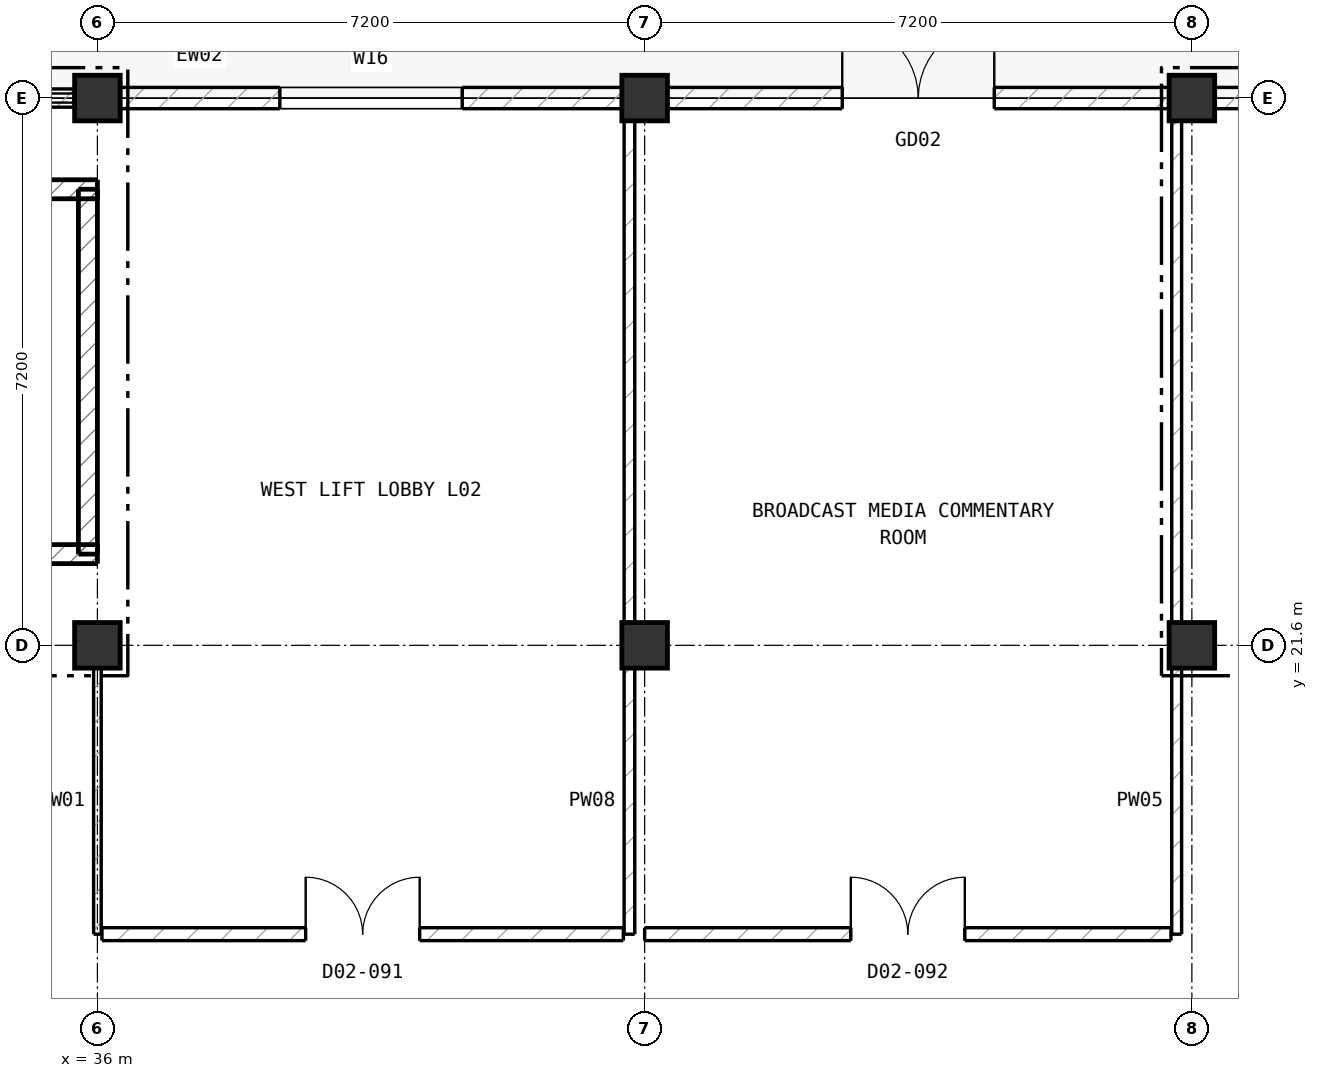
"""IFC4 building model, lengths in metres.
Left out: names, types, materials, properties, quantities, classifications, styles, units other than length and angle.
Written with IfcOpenShell. Run it as: python <this file> out.ifc"""

import sys

from ifc_helpers import new_model, si_unit, direction, frame, frame_2d, origin, origin_2d, place, context, subcontext, project, spatial, rectangle, extrude, element, fill, save


model = new_model("IFC4")
c1 = context("Model", 3, precision=1e-05, world=origin(), true_north=direction((0.0, 1.0)))
c2 = subcontext(c1, "Body", "Model", "MODEL_VIEW")
j1 = project(units=[si_unit("LENGTHUNIT", "METRE"), si_unit("PLANEANGLEUNIT", "RADIAN")], contexts=[c1])
p1 = place(None, origin())
s1 = spatial("IfcSite", under=j1, at=p1, CompositionType="ELEMENT")
p2 = place(p1, origin())
s2 = spatial("IfcBuilding", under=s1, at=p2, CompositionType="ELEMENT")
p3 = place(p2, frame((0.0, 0.0, 11.2)))
s3 = spatial("IfcBuildingStorey", under=s2, at=p3, CompositionType="ELEMENT", Elevation=11.2)
for number, where, z_axis, x_axis in (
    (1, (36.0, 21.6, 0.0), (0.0, 0.0, 1.0), (1.0, 0.0, 0.0)),
    (2, (36.0, 28.8, 0.0), (0.0, 0.0, 1.0), (1.0, 0.0, 0.0)),
    (3, (43.2, 21.6, 0.0), (0.0, 0.0, 1.0), (1.0, 0.0, 0.0)),
    (4, (43.2, 28.8, 0.0), (0.0, 0.0, 1.0), (1.0, 0.0, 0.0)),
    (5, (50.4, 21.6, 0.0), (0.0, 0.0, 1.0), (1.0, 0.0, 0.0)),
    (6, (50.4, 28.8, 0.0), (0.0, 0.0, 1.0), (1.0, 0.0, 0.0)),
):
    element("IfcColumn", number, at=place(p3, frame(where, z_axis=z_axis, x_axis=x_axis)), inside=s3, PredefinedType="COLUMN", context=c2, shape_type="SweptSolid", body=[
        extrude(rectangle(XDim=0.6, YDim=0.6, at=origin_2d()), origin(), (0.0, 0.0, 1.0), 4.8),
    ])
p4 = place(p3, frame((29.085, 28.8, 0.0), z_axis=(0.0, 0.0, 1.0), x_axis=(1.0, 0.0, 0.0)))
e7 = element("IfcWall", 7, at=p4, inside=s3, PredefinedType="SOLIDWALL", context=c2, shape_type="SweptSolid", body=[
    extrude(rectangle(XDim=6.63, YDim=0.24, at=frame_2d((3.315, 0.0))), origin(), (0.0, 0.0, 1.0), 0.35),
])
p5 = place(p3, frame((36.285, 28.8, 0.0), z_axis=(0.0, 0.0, 1.0), x_axis=(1.0, 0.0, 0.0)))
e8 = element("IfcWall", 8, at=p5, inside=s3, PredefinedType="SOLIDWALL", context=c2, shape_type="SweptSolid", body=[
    extrude(rectangle(XDim=6.63, YDim=0.28, at=frame_2d((3.315, 0.0))), origin(), (0.0, 0.0, 1.0), 4.185),
])
p6 = place(p5, frame((2.115, 0.0, 0.9)))
e9 = element("IfcOpeningElement", 9, at=p6, cuts=e8, PredefinedType="OPENING", context=c2, shape_type="SweptSolid", body=[
    extrude(rectangle(XDim=2.4, YDim=2.1, at=frame_2d((1.2, 1.05))), frame((0.0, 0.15, 0.0), z_axis=(0.0, -1.0, 0.0), x_axis=(1.0, 0.0, 0.0)), (0.0, 0.0, 1.0), 0.3),
])
p7 = place(p3, frame((43.485, 28.8, 0.0), z_axis=(0.0, 0.0, 1.0), x_axis=(1.0, 0.0, 0.0)))
e10 = element("IfcWall", 10, at=p7, inside=s3, PredefinedType="SOLIDWALL", context=c2, shape_type="SweptSolid", body=[
    extrude(rectangle(XDim=6.63, YDim=0.28, at=frame_2d((3.315, 0.0))), origin(), (0.0, 0.0, 1.0), 4.185),
])
p8 = place(p7, frame((2.315, 0.0, 0.0)))
e11 = element("IfcOpeningElement", 11, at=p8, cuts=e10, PredefinedType="OPENING", context=c2, shape_type="SweptSolid", body=[
    extrude(rectangle(XDim=2.0, YDim=2.4, at=frame_2d((1.0, 1.2))), frame((0.0, 0.15, 0.0), z_axis=(0.0, -1.0, 0.0), x_axis=(1.0, 0.0, 0.0)), (0.0, 0.0, 1.0), 0.3),
])
p9 = place(p3, frame((50.685, 28.8, 0.0), z_axis=(0.0, 0.0, 1.0), x_axis=(1.0, 0.0, 0.0)))
e12 = element("IfcWall", 12, at=p9, inside=s3, PredefinedType="SOLIDWALL", context=c2, shape_type="SweptSolid", body=[
    extrude(rectangle(XDim=6.63, YDim=0.28, at=frame_2d((3.315, 0.0))), origin(), (0.0, 0.0, 1.0), 4.185),
])
p10 = place(p9, frame((2.115, 0.0, 0.9)))
e13 = element("IfcOpeningElement", 13, at=p10, cuts=e12, PredefinedType="OPENING", context=c2, shape_type="SweptSolid", body=[
    extrude(rectangle(XDim=2.4, YDim=2.1, at=frame_2d((1.2, 1.05))), frame((0.0, 0.15, 0.0), z_axis=(0.0, -1.0, 0.0), x_axis=(1.0, 0.0, 0.0)), (0.0, 0.0, 1.0), 0.3),
])
p11 = place(p3, frame((28.35, 27.6, 0.0), z_axis=(0.0, 0.0, 1.0), x_axis=(1.0, 0.0, 0.0)))
e14 = element("IfcWall", 14, at=p11, inside=s3, PredefinedType="SHEAR", context=c2, shape_type="SweptSolid", body=[
    extrude(rectangle(XDim=7.65, YDim=0.25, at=frame_2d((3.825, 0.0))), origin(), (0.0, 0.0, 1.0), 4.8),
])
p12 = place(p3, frame((35.875, 27.6, 0.0), z_axis=(0.0, 0.0, 1.0), x_axis=(0.0, -1.0, 0.0)))
e15 = element("IfcWall", 15, at=p12, inside=s3, PredefinedType="SHEAR", context=c2, shape_type="SweptSolid", body=[
    extrude(rectangle(XDim=4.8, YDim=0.25, at=frame_2d((2.4, 0.0))), origin(), (0.0, 0.0, 1.0), 4.8),
])
p13 = place(p3, frame((36.0, 22.8, 0.0), z_axis=(0.0, 0.0, 1.0), x_axis=(-1.0, 0.0, 0.0)))
e16 = element("IfcWall", 16, at=p13, inside=s3, PredefinedType="SHEAR", context=c2, shape_type="SweptSolid", body=[
    extrude(rectangle(XDim=7.65, YDim=0.25, at=frame_2d((3.825, 0.0))), origin(), (0.0, 0.0, 1.0), 4.8),
])
p14 = place(p3, frame((36.0, 17.8, 0.0), z_axis=(0.0, 0.0, 1.0), x_axis=(0.0, 1.0, 0.0)))
e17 = element("IfcWall", 17, at=p14, inside=s3, PredefinedType="PARTITIONING", context=c2, shape_type="SweptSolid", body=[
    extrude(rectangle(XDim=3.5, YDim=0.1, at=frame_2d((1.75, 0.0))), origin(), (0.0, 0.0, 1.0), 4.51),
])
p15 = place(p3, frame((43.0, 17.8, 0.0), z_axis=(0.0, 0.0, 1.0), x_axis=(0.0, 1.0, 0.0)))
e18 = element("IfcWall", 18, at=p15, inside=s3, PredefinedType="PARTITIONING", context=c2, shape_type="SweptSolid", body=[
    extrude(rectangle(XDim=3.5, YDim=0.14, at=frame_2d((1.75, 0.0))), origin(), (0.0, 0.0, 1.0), 4.51),
])
p16 = place(p3, frame((43.0, 21.9, 0.0), z_axis=(0.0, 0.0, 1.0), x_axis=(0.0, 1.0, 0.0)))
e19 = element("IfcWall", 19, at=p16, inside=s3, PredefinedType="PARTITIONING", context=c2, shape_type="SweptSolid", body=[
    extrude(rectangle(XDim=6.6, YDim=0.14, at=frame_2d((3.3, 0.0))), origin(), (0.0, 0.0, 1.0), 4.51),
])
p17 = place(p3, frame((50.2, 17.8, 0.0), z_axis=(0.0, 0.0, 1.0), x_axis=(0.0, 1.0, 0.0)))
e20 = element("IfcWall", 20, at=p17, inside=s3, PredefinedType="PARTITIONING", context=c2, shape_type="SweptSolid", body=[
    extrude(rectangle(XDim=3.5, YDim=0.13, at=frame_2d((1.75, 0.0))), origin(), (0.0, 0.0, 1.0), 4.51),
])
p18 = place(p3, frame((50.2, 21.9, 0.0), z_axis=(0.0, 0.0, 1.0), x_axis=(0.0, 1.0, 0.0)))
e21 = element("IfcWall", 21, at=p18, inside=s3, PredefinedType="PARTITIONING", context=c2, shape_type="SweptSolid", body=[
    extrude(rectangle(XDim=6.6, YDim=0.13, at=frame_2d((3.3, 0.0))), origin(), (0.0, 0.0, 1.0), 4.51),
])
p19 = place(p3, frame((36.06, 17.8, 0.0), z_axis=(0.0, 0.0, 1.0), x_axis=(1.0, 0.0, 0.0)))
e22 = element("IfcWall", 22, at=p19, inside=s3, PredefinedType="PARTITIONING", context=c2, shape_type="SweptSolid", body=[
    extrude(rectangle(XDim=6.86, YDim=0.17, at=frame_2d((3.43, 0.0))), origin(), (0.0, 0.0, 1.0), 4.51),
])
p20 = place(p19, frame((2.68, 0.0, 0.0)))
e23 = element("IfcOpeningElement", 23, at=p20, cuts=e22, PredefinedType="OPENING", context=c2, shape_type="SweptSolid", body=[
    extrude(rectangle(XDim=1.5, YDim=2.2, at=frame_2d((0.75, 1.1))), frame((0.0, 0.095, 0.0), z_axis=(0.0, -1.0, 0.0), x_axis=(1.0, 0.0, 0.0)), (0.0, 0.0, 1.0), 0.19),
])
p21 = place(p3, frame((43.2, 17.8, 0.0), z_axis=(0.0, 0.0, 1.0), x_axis=(1.0, 0.0, 0.0)))
e24 = element("IfcWall", 24, at=p21, inside=s3, PredefinedType="PARTITIONING", context=c2, shape_type="SweptSolid", body=[
    extrude(rectangle(XDim=6.925, YDim=0.17, at=frame_2d((3.462, 0.0))), origin(), (0.0, 0.0, 1.0), 4.51),
])
p22 = place(p21, frame((2.712, 0.0, 0.0)))
e25 = element("IfcOpeningElement", 25, at=p22, cuts=e24, PredefinedType="OPENING", context=c2, shape_type="SweptSolid", body=[
    extrude(rectangle(XDim=1.5, YDim=2.2, at=frame_2d((0.75, 1.1))), frame((0.0, 0.095, 0.0), z_axis=(0.0, -1.0, 0.0), x_axis=(1.0, 0.0, 0.0)), (0.0, 0.0, 1.0), 0.19),
])
p23 = place(p6, origin())
e26 = element("IfcWindow", 26, at=p23, inside=s3, PartitioningType="SINGLE_PANEL", PredefinedType="WINDOW", context=c2, shape_type="SweptSolid", body=[
    extrude(rectangle(XDim=2.4, YDim=2.1, at=frame_2d((1.2, 1.05))), frame((0.0, 0.03, 0.0), z_axis=(0.0, -1.0, 0.0), x_axis=(1.0, 0.0, 0.0)), (0.0, 0.0, 1.0), 0.06),
])
fill(e9, e26)
p24 = place(p8, origin())
e27 = element("IfcDoor", 27, at=p24, inside=s3, OperationType="DOUBLE_DOOR_SINGLE_SWING", PredefinedType="DOOR", context=c2, shape_type="SweptSolid", body=[
    extrude(rectangle(XDim=2.0, YDim=2.4, at=frame_2d((1.0, 1.2))), frame((0.0, 0.025, 0.0), z_axis=(0.0, -1.0, 0.0), x_axis=(1.0, 0.0, 0.0)), (0.0, 0.0, 1.0), 0.05),
])
fill(e11, e27)
p25 = place(p20, origin())
e28 = element("IfcDoor", 28, at=p25, inside=s3, OperationType="DOUBLE_DOOR_SINGLE_SWING", PredefinedType="DOOR", context=c2, shape_type="SweptSolid", body=[
    extrude(rectangle(XDim=1.5, YDim=2.2, at=frame_2d((0.75, 1.1))), frame((0.0, 0.025, 0.0), z_axis=(0.0, -1.0, 0.0), x_axis=(1.0, 0.0, 0.0)), (0.0, 0.0, 1.0), 0.05),
])
fill(e23, e28)
p26 = place(p22, origin())
e29 = element("IfcDoor", 29, at=p26, inside=s3, OperationType="DOUBLE_DOOR_SINGLE_SWING", PredefinedType="DOOR", context=c2, shape_type="SweptSolid", body=[
    extrude(rectangle(XDim=1.5, YDim=2.2, at=frame_2d((0.75, 1.1))), frame((0.0, 0.025, 0.0), z_axis=(0.0, -1.0, 0.0), x_axis=(1.0, 0.0, 0.0)), (0.0, 0.0, 1.0), 0.05),
])
fill(e25, e29)
save(model, sys.argv[1])
